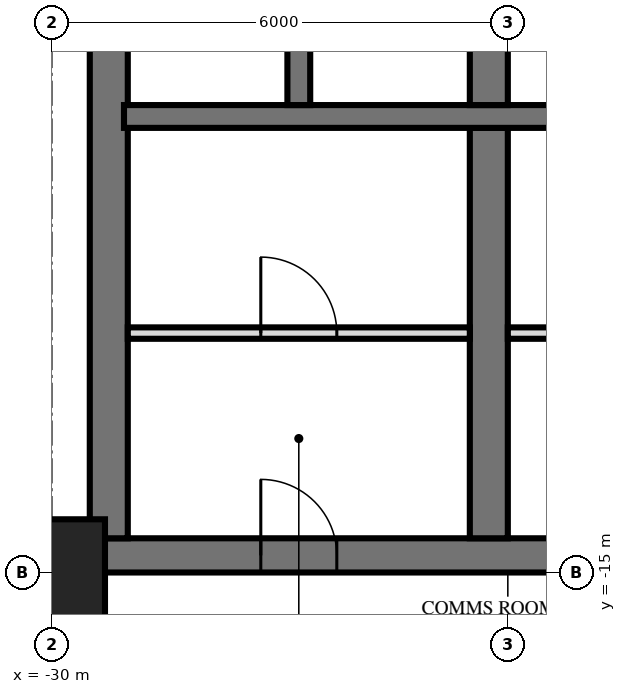
"""IFC4 building model, lengths in metres.
Left out: names, types, materials, properties, quantities, classifications, styles, units other than length and angle.
Written with IfcOpenShell. Run it as: python <this file> out.ifc"""

import sys

from ifc_helpers import new_model, si_unit, direction, frame, frame_2d, origin, origin_2d, place, context, subcontext, project, spatial, rectangle, extrude, element, fill, save


model = new_model("IFC4")
c1 = context("Model", 3, precision=1e-05, world=origin(), true_north=direction((0.0, 1.0)))
c2 = subcontext(c1, "Body", "Model", "MODEL_VIEW")
j1 = project(units=[si_unit("LENGTHUNIT", "METRE"), si_unit("PLANEANGLEUNIT", "RADIAN")], contexts=[c1])
p1 = place(None, origin())
s1 = spatial("IfcSite", under=j1, at=p1, CompositionType="ELEMENT")
p2 = place(p1, origin())
s2 = spatial("IfcBuilding", under=s1, at=p2, CompositionType="ELEMENT")
p3 = place(p2, frame((0.0, 0.0, 27.6)))
s3 = spatial("IfcBuildingStorey", under=s2, at=p3, CompositionType="ELEMENT", Elevation=27.6)
p4 = place(p3, frame((-30.0, -15.0, 0.0), z_axis=(0.0, 0.0, 1.0), x_axis=(1.0, 0.0, 0.0)))
e1 = element("IfcColumn", 1, at=p4, inside=s3, PredefinedType="COLUMN", context=c2, shape_type="SweptSolid", body=[
    extrude(rectangle(XDim=1.4, YDim=1.4, at=origin_2d()), origin(), (0.0, 0.0, 1.0), 3.6),
])
p5 = place(p3, frame((-29.5, -14.775, 0.0), z_axis=(0.0, 0.0, 1.0), x_axis=(1.0, 0.0, 0.0)))
e2 = element("IfcWall", 2, at=p5, inside=s3, PredefinedType="SHEAR", context=c2, shape_type="SweptSolid", body=[
    extrude(rectangle(XDim=19.5, YDim=0.45, at=frame_2d((9.75, 0.0))), origin(), (0.0, 0.0, 1.0), 3.6),
])
p6 = place(p5, frame((11.2, 0.0, 0.0)))
e3 = element("IfcOpeningElement", 3, at=p6, cuts=e2, PredefinedType="OPENING", context=c2, shape_type="SweptSolid", body=[
    extrude(rectangle(XDim=1.2, YDim=2.1, at=frame_2d((0.6, 1.05))), frame((0.0, 0.235, 0.0), z_axis=(0.0, -1.0, 0.0), x_axis=(1.0, 0.0, 0.0)), (0.0, 0.0, 1.0), 0.47),
])
p7 = place(p5, frame((14.25, 0.0, 0.0)))
e4 = element("IfcOpeningElement", 4, at=p7, cuts=e2, PredefinedType="OPENING", context=c2, shape_type="SweptSolid", body=[
    extrude(rectangle(XDim=1.1, YDim=2.1, at=frame_2d((0.55, 1.05))), frame((0.0, 0.235, 0.0), z_axis=(0.0, -1.0, 0.0), x_axis=(1.0, 0.0, 0.0)), (0.0, 0.0, 1.0), 0.47),
])
p8 = place(p5, frame((8.5, 0.0, 0.0)))
e5 = element("IfcOpeningElement", 5, at=p8, cuts=e2, PredefinedType="OPENING", context=c2, shape_type="SweptSolid", body=[
    extrude(rectangle(XDim=0.9, YDim=2.1, at=frame_2d((0.45, 1.05))), frame((0.0, 0.235, 0.0), z_axis=(0.0, -1.0, 0.0), x_axis=(1.0, 0.0, 0.0)), (0.0, 0.0, 1.0), 0.47),
])
p9 = place(p5, frame((6.05, 0.0, 0.0)))
e6 = element("IfcOpeningElement", 6, at=p9, cuts=e2, PredefinedType="OPENING", context=c2, shape_type="SweptSolid", body=[
    extrude(rectangle(XDim=1.0, YDim=2.1, at=frame_2d((0.5, 1.05))), frame((0.0, 0.235, 0.0), z_axis=(0.0, -1.0, 0.0), x_axis=(1.0, 0.0, 0.0)), (0.0, 0.0, 1.0), 0.47),
])
p10 = place(p5, frame((2.25, 0.0, 0.0)))
e7 = element("IfcOpeningElement", 7, at=p10, cuts=e2, PredefinedType="OPENING", context=c2, shape_type="SweptSolid", body=[
    extrude(rectangle(XDim=1.0, YDim=2.1, at=frame_2d((0.5, 1.05))), frame((0.0, 0.235, 0.0), z_axis=(0.0, -1.0, 0.0), x_axis=(1.0, 0.0, 0.0)), (0.0, 0.0, 1.0), 0.47),
])
p11 = place(p3, frame((-29.25, -14.55, 0.0), z_axis=(0.0, 0.0, 1.0), x_axis=(0.0, 1.0, 0.0)))
e8 = element("IfcWall", 8, at=p11, inside=s3, PredefinedType="SHEAR", context=c2, shape_type="SweptSolid", body=[
    extrude(rectangle(XDim=14.1, YDim=0.5, at=frame_2d((7.05, 0.0))), origin(), (0.0, 0.0, 1.0), 3.6),
])
p12 = place(p3, frame((-29.05, -9.0, 0.0), z_axis=(0.0, 0.0, 1.0), x_axis=(1.0, 0.0, 0.0)))
e9 = element("IfcWall", 9, at=p12, inside=s3, PredefinedType="SHEAR", context=c2, shape_type="SweptSolid", body=[
    extrude(rectangle(XDim=18.7, YDim=0.3, at=frame_2d((9.35, 0.0))), origin(), (0.0, 0.0, 1.0), 3.6),
])
p13 = place(p12, frame((13.8, 0.0, 0.0)))
e10 = element("IfcOpeningElement", 10, at=p13, cuts=e9, PredefinedType="OPENING", context=c2, shape_type="SweptSolid", body=[
    extrude(rectangle(XDim=1.1, YDim=2.1, at=frame_2d((0.55, 1.05))), frame((0.0, 0.16, 0.0), z_axis=(0.0, -1.0, 0.0), x_axis=(1.0, 0.0, 0.0)), (0.0, 0.0, 1.0), 0.32),
])
p14 = place(p3, frame((-24.25, -8.85, 0.0), z_axis=(0.0, 0.0, 1.0), x_axis=(0.0, 1.0, 0.0)))
e11 = element("IfcWall", 11, at=p14, inside=s3, PredefinedType="SHEAR", context=c2, shape_type="SweptSolid", body=[
    extrude(rectangle(XDim=2.3, YDim=0.5, at=frame_2d((1.15, 0.0))), origin(), (0.0, 0.0, 1.0), 3.6),
])
p15 = place(p3, frame((-24.25, -14.55, 0.0), z_axis=(0.0, 0.0, 1.0), x_axis=(0.0, 1.0, 0.0)))
e12 = element("IfcWall", 12, at=p15, inside=s3, PredefinedType="SHEAR", context=c2, shape_type="SweptSolid", body=[
    extrude(rectangle(XDim=5.4, YDim=0.5, at=frame_2d((2.7, 0.0))), origin(), (0.0, 0.0, 1.0), 3.6),
])
p16 = place(p3, frame((-26.75, -8.85, 0.0), z_axis=(0.0, 0.0, 1.0), x_axis=(0.0, 1.0, 0.0)))
e13 = element("IfcWall", 13, at=p16, inside=s3, PredefinedType="SHEAR", context=c2, shape_type="SweptSolid", body=[
    extrude(rectangle(XDim=2.3, YDim=0.3, at=frame_2d((1.15, 0.0))), origin(), (0.0, 0.0, 1.0), 3.6),
])
p17 = place(p3, frame((-24.0, -11.85, 0.0), z_axis=(0.0, 0.0, 1.0), x_axis=(1.0, 0.0, 0.0)))
e14 = element("IfcWall", 14, at=p17, inside=s3, PredefinedType="PARTITIONING", context=c2, shape_type="SweptSolid", body=[
    extrude(rectangle(XDim=2.1, YDim=0.15, at=frame_2d((1.05, 0.0))), origin(), (0.0, 0.0, 1.0), 3.3),
])
p18 = place(p17, frame((0.55, 0.0, 0.0)))
e15 = element("IfcOpeningElement", 15, at=p18, cuts=e14, PredefinedType="OPENING", context=c2, shape_type="SweptSolid", body=[
    extrude(rectangle(XDim=1.0, YDim=2.1, at=frame_2d((0.5, 1.05))), frame((0.0, 0.085, 0.0), z_axis=(0.0, -1.0, 0.0), x_axis=(1.0, 0.0, 0.0)), (0.0, 0.0, 1.0), 0.17),
])
p19 = place(p3, frame((-29.0, -11.85, 0.0), z_axis=(0.0, 0.0, 1.0), x_axis=(1.0, 0.0, 0.0)))
e16 = element("IfcWall", 16, at=p19, inside=s3, PredefinedType="PARTITIONING", context=c2, shape_type="SweptSolid", body=[
    extrude(rectangle(XDim=4.5, YDim=0.15, at=frame_2d((2.25, 0.0))), origin(), (0.0, 0.0, 1.0), 3.3),
])
p20 = place(p19, frame((1.75, 0.0, 0.0)))
e17 = element("IfcOpeningElement", 17, at=p20, cuts=e16, PredefinedType="OPENING", context=c2, shape_type="SweptSolid", body=[
    extrude(rectangle(XDim=1.0, YDim=2.1, at=frame_2d((0.5, 1.05))), frame((0.0, 0.085, 0.0), z_axis=(0.0, -1.0, 0.0), x_axis=(1.0, 0.0, 0.0)), (0.0, 0.0, 1.0), 0.17),
])
p21 = place(p3, frame((-33.12, -15.0, 0.0), z_axis=(0.0, 0.0, 1.0), x_axis=(1.0, 0.0, 0.0)))
e18 = element("IfcWall", 18, at=p21, inside=s3, PredefinedType="PARTITIONING", context=c2, shape_type="SweptSolid", body=[
    extrude(rectangle(XDim=3.57, YDim=0.15, at=frame_2d((1.785, 0.0))), origin(), (0.0, 0.0, 1.0), 3.32),
])
p22 = place(p21, frame((1.58, 0.0, 0.0)))
e19 = element("IfcOpeningElement", 19, at=p22, cuts=e18, PredefinedType="OPENING", context=c2, shape_type="SweptSolid", body=[
    extrude(rectangle(XDim=0.8, YDim=2.1, at=frame_2d((0.4, 1.05))), frame((0.0, 0.085, 0.0), z_axis=(0.0, -1.0, 0.0), x_axis=(1.0, 0.0, 0.0)), (0.0, 0.0, 1.0), 0.17),
])
p23 = place(p10, origin())
e20 = element("IfcDoor", 20, at=p23, inside=s3, OperationType="SINGLE_SWING_RIGHT", PredefinedType="DOOR", context=c2, shape_type="SweptSolid", body=[
    extrude(rectangle(XDim=1.0, YDim=2.1, at=frame_2d((0.5, 1.05))), frame((0.0, 0.025, 0.0), z_axis=(0.0, -1.0, 0.0), x_axis=(1.0, 0.0, 0.0)), (0.0, 0.0, 1.0), 0.05),
])
fill(e7, e20)
p24 = place(p20, origin())
e21 = element("IfcDoor", 21, at=p24, inside=s3, OperationType="SINGLE_SWING_RIGHT", PredefinedType="DOOR", context=c2, shape_type="SweptSolid", body=[
    extrude(rectangle(XDim=1.0, YDim=2.1, at=frame_2d((0.5, 1.05))), frame((0.0, 0.025, 0.0), z_axis=(0.0, -1.0, 0.0), x_axis=(1.0, 0.0, 0.0)), (0.0, 0.0, 1.0), 0.05),
])
fill(e17, e21)
save(model, sys.argv[1])
